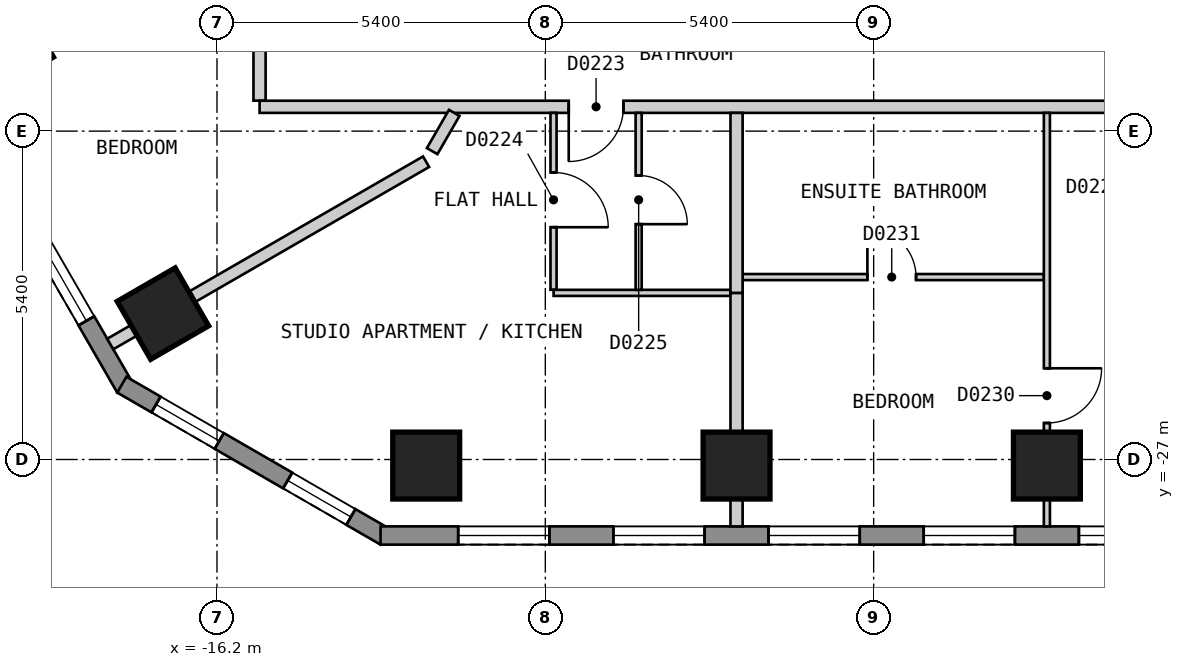
"""IFC4 building model, lengths in metres.
Left out: names, types, materials, properties, quantities, classifications, styles, units other than length and angle.
Written with IfcOpenShell. Run it as: python <this file> out.ifc"""

import sys

from ifc_helpers import new_model, si_unit, direction, frame, frame_2d, origin, origin_2d, place, context, subcontext, project, spatial, polyline, rectangle, outline, extrude, element, fill, save


model = new_model("IFC4")
c1 = context("Model", 3, precision=1e-05, world=origin(), true_north=direction((0.0, 1.0)))
c2 = subcontext(c1, "Body", "Model", "MODEL_VIEW")
j1 = project(units=[si_unit("LENGTHUNIT", "METRE"), si_unit("PLANEANGLEUNIT", "RADIAN")], contexts=[c1])
p1 = place(None, origin())
s1 = spatial("IfcSite", under=j1, at=p1, CompositionType="ELEMENT")
p2 = place(p1, origin())
s2 = spatial("IfcBuilding", under=s1, at=p2, CompositionType="ELEMENT")
p3 = place(p2, frame((0.0, 0.0, 47.4)))
s3 = spatial("IfcBuildingStorey", under=s2, at=p3, CompositionType="ELEMENT", Elevation=47.4)
for number, where, z_axis, x_axis in (
    (1, (-19.641, -20.181, 0.0), (0.0, 0.0, 1.0), (0.5, -0.866, 0.0)),
    (2, (-17.089, -24.601, 0.0), (0.0, 0.0, 1.0), (0.5, -0.866, 0.0)),
    (3, (-12.759, -27.1, 0.0), (0.0, 0.0, 1.0), (1.0, 0.0, 0.0)),
    (4, (-7.655, -27.1, 0.0), (0.0, 0.0, 1.0), (1.0, 0.0, 0.0)),
    (5, (-2.551, -27.1, 0.0), (0.0, 0.0, 1.0), (1.0, 0.0, 0.0)),
):
    element("IfcColumn", number, at=place(p3, frame(where, z_axis=z_axis, x_axis=x_axis)), inside=s3, PredefinedType="COLUMN", context=c2, shape_type="SweptSolid", body=[
        extrude(rectangle(XDim=1.1, YDim=1.1, at=origin_2d()), origin(), (0.0, 0.0, 1.0), 3.0),
    ])
p4 = place(p3, frame((-31.22, -2.425, 0.0), z_axis=(0.0, 0.0, 1.0), x_axis=(0.500001938803, -0.866024284413, 0.0)))
e6 = element("IfcWall", 6, at=p4, inside=s3, PredefinedType="SOLIDWALL", context=c2, shape_type="SweptSolid", body=[
    extrude(outline(polyline([(0.0, -0.15), (27.02, -0.15), (26.94, 0.15), (0.08, 0.15), (0.0, -0.15)])), origin(), (0.0, 0.0, 1.0), 2.7),
])
p5 = place(p4, frame((1.277, 0.0, 0.15)))
e7 = element("IfcOpeningElement", 7, at=p5, cuts=e6, PredefinedType="OPENING", context=c2, shape_type="SweptSolid", body=[
    extrude(rectangle(XDim=1.5, YDim=2.1, at=frame_2d((0.75, 1.05))), frame((0.0, 0.16, 0.0), z_axis=(0.0, -1.0, 0.0), x_axis=(1.0, 0.0, 0.0)), (0.0, 0.0, 1.0), 0.32),
])
p6 = place(p4, frame((3.829, 0.0, 0.15)))
e8 = element("IfcOpeningElement", 8, at=p6, cuts=e6, PredefinedType="OPENING", context=c2, shape_type="SweptSolid", body=[
    extrude(rectangle(XDim=1.5, YDim=2.1, at=frame_2d((0.75, 1.05))), frame((0.0, 0.16, 0.0), z_axis=(0.0, -1.0, 0.0), x_axis=(1.0, 0.0, 0.0)), (0.0, 0.0, 1.0), 0.32),
])
p7 = place(p4, frame((6.382, 0.0, 0.15)))
e9 = element("IfcOpeningElement", 9, at=p7, cuts=e6, PredefinedType="OPENING", context=c2, shape_type="SweptSolid", body=[
    extrude(rectangle(XDim=1.5, YDim=2.1, at=frame_2d((0.75, 1.05))), frame((0.0, 0.16, 0.0), z_axis=(0.0, -1.0, 0.0), x_axis=(1.0, 0.0, 0.0)), (0.0, 0.0, 1.0), 0.32),
])
p8 = place(p4, frame((8.933, 0.0, 0.15)))
e10 = element("IfcOpeningElement", 10, at=p8, cuts=e6, PredefinedType="OPENING", context=c2, shape_type="SweptSolid", body=[
    extrude(rectangle(XDim=1.5, YDim=2.1, at=frame_2d((0.75, 1.05))), frame((0.0, 0.16, 0.0), z_axis=(0.0, -1.0, 0.0), x_axis=(1.0, 0.0, 0.0)), (0.0, 0.0, 1.0), 0.32),
])
p9 = place(p4, frame((11.485, 0.0, 0.15)))
e11 = element("IfcOpeningElement", 11, at=p9, cuts=e6, PredefinedType="OPENING", context=c2, shape_type="SweptSolid", body=[
    extrude(rectangle(XDim=1.5, YDim=2.1, at=frame_2d((0.75, 1.05))), frame((0.0, 0.16, 0.0), z_axis=(0.0, -1.0, 0.0), x_axis=(1.0, 0.0, 0.0)), (0.0, 0.0, 1.0), 0.32),
])
p10 = place(p4, frame((14.037, 0.0, 0.15)))
e12 = element("IfcOpeningElement", 12, at=p10, cuts=e6, PredefinedType="OPENING", context=c2, shape_type="SweptSolid", body=[
    extrude(rectangle(XDim=1.5, YDim=2.1, at=frame_2d((0.75, 1.05))), frame((0.0, 0.16, 0.0), z_axis=(0.0, -1.0, 0.0), x_axis=(1.0, 0.0, 0.0)), (0.0, 0.0, 1.0), 0.32),
])
p11 = place(p4, frame((16.589, 0.0, 0.15)))
e13 = element("IfcOpeningElement", 13, at=p11, cuts=e6, PredefinedType="OPENING", context=c2, shape_type="SweptSolid", body=[
    extrude(rectangle(XDim=1.5, YDim=2.1, at=frame_2d((0.75, 1.05))), frame((0.0, 0.16, 0.0), z_axis=(0.0, -1.0, 0.0), x_axis=(1.0, 0.0, 0.0)), (0.0, 0.0, 1.0), 0.32),
])
p12 = place(p4, frame((19.141, 0.0, 0.15)))
e14 = element("IfcOpeningElement", 14, at=p12, cuts=e6, PredefinedType="OPENING", context=c2, shape_type="SweptSolid", body=[
    extrude(rectangle(XDim=1.5, YDim=2.1, at=frame_2d((0.75, 1.05))), frame((0.0, 0.16, 0.0), z_axis=(0.0, -1.0, 0.0), x_axis=(1.0, 0.0, 0.0)), (0.0, 0.0, 1.0), 0.32),
])
p13 = place(p4, frame((21.693, 0.0, 0.15)))
e15 = element("IfcOpeningElement", 15, at=p13, cuts=e6, PredefinedType="OPENING", context=c2, shape_type="SweptSolid", body=[
    extrude(rectangle(XDim=1.5, YDim=2.1, at=frame_2d((0.75, 1.05))), frame((0.0, 0.16, 0.0), z_axis=(0.0, -1.0, 0.0), x_axis=(1.0, 0.0, 0.0)), (0.0, 0.0, 1.0), 0.32),
])
p14 = place(p4, frame((24.244, 0.0, 0.15)))
e16 = element("IfcOpeningElement", 16, at=p14, cuts=e6, PredefinedType="OPENING", context=c2, shape_type="SweptSolid", body=[
    extrude(rectangle(XDim=1.5, YDim=2.1, at=frame_2d((0.75, 1.05))), frame((0.0, 0.16, 0.0), z_axis=(0.0, -1.0, 0.0), x_axis=(1.0, 0.0, 0.0)), (0.0, 0.0, 1.0), 0.32),
])
p15 = place(p3, frame((-17.765, -25.77, 0.0), z_axis=(0.0, 0.0, 1.0), x_axis=(0.866010750942, -0.50002537861, 0.0)))
e17 = element("IfcWall", 17, at=p15, inside=s3, PredefinedType="SOLIDWALL", context=c2, shape_type="SweptSolid", body=[
    extrude(outline(polyline([(0.0, -0.15), (5.0, -0.15), (4.919, 0.15), (0.08, 0.15), (0.0, -0.15)])), origin(), (0.0, 0.0, 1.0), 2.7),
])
p16 = place(p15, frame((0.65, 0.0, 0.15)))
e18 = element("IfcOpeningElement", 18, at=p16, cuts=e17, PredefinedType="OPENING", context=c2, shape_type="SweptSolid", body=[
    extrude(rectangle(XDim=1.2, YDim=2.1, at=frame_2d((0.6, 1.05))), frame((0.0, 0.16, 0.0), z_axis=(0.0, -1.0, 0.0), x_axis=(1.0, 0.0, 0.0)), (0.0, 0.0, 1.0), 0.32),
])
p17 = place(p15, frame((3.15, 0.0, 0.15)))
e19 = element("IfcOpeningElement", 19, at=p17, cuts=e17, PredefinedType="OPENING", context=c2, shape_type="SweptSolid", body=[
    extrude(rectangle(XDim=1.2, YDim=2.1, at=frame_2d((0.6, 1.05))), frame((0.0, 0.16, 0.0), z_axis=(0.0, -1.0, 0.0), x_axis=(1.0, 0.0, 0.0)), (0.0, 0.0, 1.0), 0.32),
])
p18 = place(p3, frame((-13.51, -28.25, 0.0), z_axis=(0.0, 0.0, 1.0), x_axis=(1.0, 0.0, 0.0)))
e20 = element("IfcWall", 20, at=p18, inside=s3, PredefinedType="SOLIDWALL", context=c2, shape_type="SweptSolid", body=[
    extrude(outline(polyline([(0.0, -0.15), (27.02, -0.15), (26.94, 0.15), (0.08, 0.15), (0.0, -0.15)])), origin(), (0.0, 0.0, 1.0), 2.7),
])
p19 = place(p18, frame((1.277, 0.0, 0.15)))
e21 = element("IfcOpeningElement", 21, at=p19, cuts=e20, PredefinedType="OPENING", context=c2, shape_type="SweptSolid", body=[
    extrude(rectangle(XDim=1.5, YDim=2.1, at=frame_2d((0.75, 1.05))), frame((0.0, 0.16, 0.0), z_axis=(0.0, -1.0, 0.0), x_axis=(1.0, 0.0, 0.0)), (0.0, 0.0, 1.0), 0.32),
])
p20 = place(p18, frame((3.829, 0.0, 0.15)))
e22 = element("IfcOpeningElement", 22, at=p20, cuts=e20, PredefinedType="OPENING", context=c2, shape_type="SweptSolid", body=[
    extrude(rectangle(XDim=1.5, YDim=2.1, at=frame_2d((0.75, 1.05))), frame((0.0, 0.16, 0.0), z_axis=(0.0, -1.0, 0.0), x_axis=(1.0, 0.0, 0.0)), (0.0, 0.0, 1.0), 0.32),
])
p21 = place(p18, frame((6.381, 0.0, 0.15)))
e23 = element("IfcOpeningElement", 23, at=p21, cuts=e20, PredefinedType="OPENING", context=c2, shape_type="SweptSolid", body=[
    extrude(rectangle(XDim=1.5, YDim=2.1, at=frame_2d((0.75, 1.05))), frame((0.0, 0.16, 0.0), z_axis=(0.0, -1.0, 0.0), x_axis=(1.0, 0.0, 0.0)), (0.0, 0.0, 1.0), 0.32),
])
p22 = place(p18, frame((8.933, 0.0, 0.15)))
e24 = element("IfcOpeningElement", 24, at=p22, cuts=e20, PredefinedType="OPENING", context=c2, shape_type="SweptSolid", body=[
    extrude(rectangle(XDim=1.5, YDim=2.1, at=frame_2d((0.75, 1.05))), frame((0.0, 0.16, 0.0), z_axis=(0.0, -1.0, 0.0), x_axis=(1.0, 0.0, 0.0)), (0.0, 0.0, 1.0), 0.32),
])
p23 = place(p18, frame((11.485, 0.0, 0.15)))
e25 = element("IfcOpeningElement", 25, at=p23, cuts=e20, PredefinedType="OPENING", context=c2, shape_type="SweptSolid", body=[
    extrude(rectangle(XDim=1.5, YDim=2.1, at=frame_2d((0.75, 1.05))), frame((0.0, 0.16, 0.0), z_axis=(0.0, -1.0, 0.0), x_axis=(1.0, 0.0, 0.0)), (0.0, 0.0, 1.0), 0.32),
])
p24 = place(p18, frame((14.037, 0.0, 0.15)))
e26 = element("IfcOpeningElement", 26, at=p24, cuts=e20, PredefinedType="OPENING", context=c2, shape_type="SweptSolid", body=[
    extrude(rectangle(XDim=1.5, YDim=2.1, at=frame_2d((0.75, 1.05))), frame((0.0, 0.16, 0.0), z_axis=(0.0, -1.0, 0.0), x_axis=(1.0, 0.0, 0.0)), (0.0, 0.0, 1.0), 0.32),
])
p25 = place(p18, frame((16.589, 0.0, 0.15)))
e27 = element("IfcOpeningElement", 27, at=p25, cuts=e20, PredefinedType="OPENING", context=c2, shape_type="SweptSolid", body=[
    extrude(rectangle(XDim=1.5, YDim=2.1, at=frame_2d((0.75, 1.05))), frame((0.0, 0.16, 0.0), z_axis=(0.0, -1.0, 0.0), x_axis=(1.0, 0.0, 0.0)), (0.0, 0.0, 1.0), 0.32),
])
p26 = place(p18, frame((19.141, 0.0, 0.15)))
e28 = element("IfcOpeningElement", 28, at=p26, cuts=e20, PredefinedType="OPENING", context=c2, shape_type="SweptSolid", body=[
    extrude(rectangle(XDim=1.5, YDim=2.1, at=frame_2d((0.75, 1.05))), frame((0.0, 0.16, 0.0), z_axis=(0.0, -1.0, 0.0), x_axis=(1.0, 0.0, 0.0)), (0.0, 0.0, 1.0), 0.32),
])
p27 = place(p18, frame((21.693, 0.0, 0.15)))
e29 = element("IfcOpeningElement", 29, at=p27, cuts=e20, PredefinedType="OPENING", context=c2, shape_type="SweptSolid", body=[
    extrude(rectangle(XDim=1.5, YDim=2.1, at=frame_2d((0.75, 1.05))), frame((0.0, 0.16, 0.0), z_axis=(0.0, -1.0, 0.0), x_axis=(1.0, 0.0, 0.0)), (0.0, 0.0, 1.0), 0.32),
])
p28 = place(p18, frame((24.245, 0.0, 0.15)))
e30 = element("IfcOpeningElement", 30, at=p28, cuts=e20, PredefinedType="OPENING", context=c2, shape_type="SweptSolid", body=[
    extrude(rectangle(XDim=1.5, YDim=2.1, at=frame_2d((0.75, 1.05))), frame((0.0, 0.16, 0.0), z_axis=(0.0, -1.0, 0.0), x_axis=(1.0, 0.0, 0.0)), (0.0, 0.0, 1.0), 0.32),
])
p29 = place(p3, frame((-15.5, -16.5, 0.0), z_axis=(0.0, 0.0, 1.0), x_axis=(0.0, -1.0, 0.0)))
e31 = element("IfcWall", 31, at=p29, inside=s3, PredefinedType="PARTITIONING", context=c2, shape_type="SweptSolid", body=[
    extrude(rectangle(XDim=4.599, YDim=0.2, at=frame_2d((2.3, 0.0))), origin(), (0.0, 0.0, 1.0), 2.7),
])
p30 = place(p3, frame((-15.499, -21.2, 0.0), z_axis=(0.0, 0.0, 1.0), x_axis=(1.0, 0.0, 0.0)))
e32 = element("IfcWall", 32, at=p30, inside=s3, PredefinedType="PARTITIONING", context=c2, shape_type="SweptSolid", body=[
    extrude(rectangle(XDim=30.898, YDim=0.2, at=frame_2d((15.449, 0.0))), origin(), (0.0, 0.0, 1.0), 2.7),
])
p31 = place(p30, frame((5.084, 0.0, 0.0)))
e33 = element("IfcOpeningElement", 33, at=p31, cuts=e32, PredefinedType="OPENING", context=c2, shape_type="SweptSolid", body=[
    extrude(rectangle(XDim=0.9, YDim=2.1, at=frame_2d((0.45, 1.05))), frame((0.0, 0.11, 0.0), z_axis=(0.0, -1.0, 0.0), x_axis=(1.0, 0.0, 0.0)), (0.0, 0.0, 1.0), 0.22),
])
p32 = place(p30, frame((15.0, 0.0, 0.0)))
e34 = element("IfcOpeningElement", 34, at=p32, cuts=e32, PredefinedType="OPENING", context=c2, shape_type="SweptSolid", body=[
    extrude(rectangle(XDim=1.0, YDim=2.1, at=frame_2d((0.5, 1.05))), frame((0.0, 0.11, 0.0), z_axis=(0.0, -1.0, 0.0), x_axis=(1.0, 0.0, 0.0)), (0.0, 0.0, 1.0), 0.22),
])
p33 = place(p30, frame((25.015, 0.0, 0.0)))
e35 = element("IfcOpeningElement", 35, at=p33, cuts=e32, PredefinedType="OPENING", context=c2, shape_type="SweptSolid", body=[
    extrude(rectangle(XDim=0.9, YDim=2.1, at=frame_2d((0.45, 1.05))), frame((0.0, 0.11, 0.0), z_axis=(0.0, -1.0, 0.0), x_axis=(1.0, 0.0, 0.0)), (0.0, 0.0, 1.0), 0.22),
])
p34 = place(p3, frame((-10.665, -21.3, 0.0), z_axis=(0.0, 0.0, 1.0), x_axis=(0.0, -1.0, 0.0)))
e36 = element("IfcWall", 36, at=p34, inside=s3, PredefinedType="PARTITIONING", context=c2, shape_type="SweptSolid", body=[
    extrude(rectangle(XDim=2.909, YDim=0.1, at=frame_2d((1.455, 0.0))), origin(), (0.0, 0.0, 1.0), 2.7),
])
p35 = place(p34, frame((0.98, 0.0, 0.0)))
e37 = element("IfcOpeningElement", 37, at=p35, cuts=e36, PredefinedType="OPENING", context=c2, shape_type="SweptSolid", body=[
    extrude(rectangle(XDim=0.9, YDim=2.1, at=frame_2d((0.45, 1.05))), frame((0.0, 0.06, 0.0), z_axis=(0.0, -1.0, 0.0), x_axis=(1.0, 0.0, 0.0)), (0.0, 0.0, 1.0), 0.12),
])
p36 = place(p3, frame((-7.555, -24.0, 0.0), z_axis=(0.0, 0.0, 1.0), x_axis=(1.0, 0.0, 0.0)))
e38 = element("IfcWall", 38, at=p36, inside=s3, PredefinedType="PARTITIONING", context=c2, shape_type="SweptSolid", body=[
    extrude(rectangle(XDim=4.954, YDim=0.1, at=frame_2d((2.477, 0.0))), origin(), (0.0, 0.0, 1.0), 2.7),
])
p37 = place(p36, frame((2.052, 0.0, 0.0)))
e39 = element("IfcOpeningElement", 39, at=p37, cuts=e38, PredefinedType="OPENING", context=c2, shape_type="SweptSolid", body=[
    extrude(rectangle(XDim=0.8, YDim=2.1, at=frame_2d((0.4, 1.05))), frame((0.0, 0.06, 0.0), z_axis=(0.0, -1.0, 0.0), x_axis=(1.0, 0.0, 0.0)), (0.0, 0.0, 1.0), 0.12),
])
p38 = place(p3, frame((-10.664, -24.26, 0.0), z_axis=(0.0, 0.0, 1.0), x_axis=(1.0, 0.0, 0.0)))
e40 = element("IfcWall", 40, at=p38, inside=s3, PredefinedType="PARTITIONING", context=c2, shape_type="SweptSolid", body=[
    extrude(rectangle(XDim=2.909, YDim=0.1, at=frame_2d((1.455, 0.0))), origin(), (0.0, 0.0, 1.0), 2.7),
])
p39 = place(p3, frame((-9.265, -24.21, 0.0), z_axis=(0.0, 0.0, 1.0), x_axis=(0.0, 1.0, 0.0)))
e41 = element("IfcWall", 41, at=p39, inside=s3, PredefinedType="PARTITIONING", context=c2, shape_type="SweptSolid", body=[
    extrude(rectangle(XDim=2.91, YDim=0.1, at=frame_2d((1.455, 0.0))), origin(), (0.0, 0.0, 1.0), 2.7),
])
p40 = place(p39, frame((1.08, 0.0, 0.0)))
e42 = element("IfcOpeningElement", 42, at=p40, cuts=e41, PredefinedType="OPENING", context=c2, shape_type="SweptSolid", body=[
    extrude(rectangle(XDim=0.8, YDim=2.1, at=frame_2d((0.4, 1.05))), frame((0.0, 0.06, 0.0), z_axis=(0.0, -1.0, 0.0), x_axis=(1.0, 0.0, 0.0)), (0.0, 0.0, 1.0), 0.12),
])
p41 = place(p3, frame((-2.551, -28.1, 0.0), z_axis=(0.0, 0.0, 1.0), x_axis=(0.0, 1.0, 0.0)))
e43 = element("IfcWall", 43, at=p41, inside=s3, PredefinedType="PARTITIONING", context=c2, shape_type="SweptSolid", body=[
    extrude(rectangle(XDim=6.8, YDim=0.1, at=frame_2d((3.4, 0.0))), origin(), (0.0, 0.0, 1.0), 2.7),
])
p42 = place(p41, frame((1.7, 0.0, 0.0)))
e44 = element("IfcOpeningElement", 44, at=p42, cuts=e43, PredefinedType="OPENING", context=c2, shape_type="SweptSolid", body=[
    extrude(rectangle(XDim=0.9, YDim=2.1, at=frame_2d((0.45, 1.05))), frame((0.0, 0.06, 0.0), z_axis=(0.0, -1.0, 0.0), x_axis=(1.0, 0.0, 0.0)), (0.0, 0.0, 1.0), 0.12),
])
p43 = place(p3, frame((-20.507, -20.681, 0.0), z_axis=(0.0, 0.0, 1.0), x_axis=(0.866028446103, 0.499994730513, 0.0)))
e45 = element("IfcWall", 45, at=p43, inside=s3, PredefinedType="PARTITIONING", context=c2, shape_type="SweptSolid", body=[
    extrude(rectangle(XDim=5.666, YDim=0.1, at=frame_2d((2.833, 0.0))), origin(), (0.0, 0.0, 1.0), 2.7),
])
p44 = place(p43, frame((2.44, 0.0, 0.0)))
e46 = element("IfcOpeningElement", 46, at=p44, cuts=e45, PredefinedType="OPENING", context=c2, shape_type="SweptSolid", body=[
    extrude(rectangle(XDim=0.9, YDim=2.1, at=frame_2d((0.45, 1.05))), frame((0.0, 0.06, 0.0), z_axis=(0.0, -1.0, 0.0), x_axis=(1.0, 0.0, 0.0)), (0.0, 0.0, 1.0), 0.12),
])
p45 = place(p3, frame((-7.655, -24.26, 0.0), z_axis=(0.0, 0.0, 1.0), x_axis=(0.0, -1.0, 0.0)))
e47 = element("IfcWall", 47, at=p45, inside=s3, PredefinedType="PARTITIONING", context=c2, shape_type="SweptSolid", body=[
    extrude(rectangle(XDim=3.84, YDim=0.2, at=frame_2d((1.92, 0.0))), origin(), (0.0, 0.0, 1.0), 2.7),
])
p46 = place(p3, frame((-12.661, -21.929, 0.0), z_axis=(0.0, 0.0, 1.0), x_axis=(0.499683639304, 0.866207977689, 0.0)))
e48 = element("IfcWall", 48, at=p46, inside=s3, PredefinedType="PARTITIONING", context=c2, shape_type="SweptSolid", body=[
    extrude(rectangle(XDim=0.726, YDim=0.2, at=frame_2d((0.363, 0.0))), origin(), (0.0, 0.0, 1.0), 2.7),
])
p47 = place(p3, frame((-7.655, -24.26, 0.0), z_axis=(0.0, 0.0, 1.0), x_axis=(0.0, 1.0, 0.0)))
e49 = element("IfcWall", 49, at=p47, inside=s3, PredefinedType="PARTITIONING", context=c2, shape_type="SweptSolid", body=[
    extrude(rectangle(XDim=2.96, YDim=0.2, at=frame_2d((1.48, 0.0))), origin(), (0.0, 0.0, 1.0), 2.7),
])
p48 = place(p3, frame((-17.955, -25.101, 0.0), z_axis=(0.0, 0.0, 1.0), x_axis=(0.866080519133, 0.499904525262, 0.0)))
e50 = element("IfcWall", 50, at=p48, inside=s3, PredefinedType="PARTITIONING", context=c2, shape_type="SweptSolid", body=[
    extrude(rectangle(XDim=5.997, YDim=0.2, at=frame_2d((2.999, 0.0))), origin(), (0.0, 0.0, 1.0), 2.7),
])
p49 = place(p14, origin())
e51 = element("IfcWindow", 51, at=p49, inside=s3, PartitioningType="SINGLE_PANEL", PredefinedType="WINDOW", context=c2, shape_type="SweptSolid", body=[
    extrude(rectangle(XDim=1.5, YDim=2.1, at=frame_2d((0.75, 1.05))), frame((0.0, 0.03, 0.0), z_axis=(0.0, -1.0, 0.0), x_axis=(1.0, 0.0, 0.0)), (0.0, 0.0, 1.0), 0.06),
])
fill(e16, e51)
p50 = place(p16, origin())
e52 = element("IfcWindow", 52, at=p50, inside=s3, PartitioningType="SINGLE_PANEL", PredefinedType="WINDOW", context=c2, shape_type="SweptSolid", body=[
    extrude(rectangle(XDim=1.2, YDim=2.1, at=frame_2d((0.6, 1.05))), frame((0.0, 0.03, 0.0), z_axis=(0.0, -1.0, 0.0), x_axis=(1.0, 0.0, 0.0)), (0.0, 0.0, 1.0), 0.06),
])
fill(e18, e52)
p51 = place(p17, origin())
e53 = element("IfcWindow", 53, at=p51, inside=s3, PartitioningType="SINGLE_PANEL", PredefinedType="WINDOW", context=c2, shape_type="SweptSolid", body=[
    extrude(rectangle(XDim=1.2, YDim=2.1, at=frame_2d((0.6, 1.05))), frame((0.0, 0.03, 0.0), z_axis=(0.0, -1.0, 0.0), x_axis=(1.0, 0.0, 0.0)), (0.0, 0.0, 1.0), 0.06),
])
fill(e19, e53)
p52 = place(p19, origin())
e54 = element("IfcWindow", 54, at=p52, inside=s3, PartitioningType="SINGLE_PANEL", PredefinedType="WINDOW", context=c2, shape_type="SweptSolid", body=[
    extrude(rectangle(XDim=1.5, YDim=2.1, at=frame_2d((0.75, 1.05))), frame((0.0, 0.03, 0.0), z_axis=(0.0, -1.0, 0.0), x_axis=(1.0, 0.0, 0.0)), (0.0, 0.0, 1.0), 0.06),
])
fill(e21, e54)
p53 = place(p20, origin())
e55 = element("IfcWindow", 55, at=p53, inside=s3, PartitioningType="SINGLE_PANEL", PredefinedType="WINDOW", context=c2, shape_type="SweptSolid", body=[
    extrude(rectangle(XDim=1.5, YDim=2.1, at=frame_2d((0.75, 1.05))), frame((0.0, 0.03, 0.0), z_axis=(0.0, -1.0, 0.0), x_axis=(1.0, 0.0, 0.0)), (0.0, 0.0, 1.0), 0.06),
])
fill(e22, e55)
p54 = place(p21, origin())
e56 = element("IfcWindow", 56, at=p54, inside=s3, PartitioningType="SINGLE_PANEL", PredefinedType="WINDOW", context=c2, shape_type="SweptSolid", body=[
    extrude(rectangle(XDim=1.5, YDim=2.1, at=frame_2d((0.75, 1.05))), frame((0.0, 0.03, 0.0), z_axis=(0.0, -1.0, 0.0), x_axis=(1.0, 0.0, 0.0)), (0.0, 0.0, 1.0), 0.06),
])
fill(e23, e56)
p55 = place(p22, origin())
e57 = element("IfcWindow", 57, at=p55, inside=s3, PartitioningType="SINGLE_PANEL", PredefinedType="WINDOW", context=c2, shape_type="SweptSolid", body=[
    extrude(rectangle(XDim=1.5, YDim=2.1, at=frame_2d((0.75, 1.05))), frame((0.0, 0.03, 0.0), z_axis=(0.0, -1.0, 0.0), x_axis=(1.0, 0.0, 0.0)), (0.0, 0.0, 1.0), 0.06),
])
fill(e24, e57)
p56 = place(p23, origin())
e58 = element("IfcWindow", 58, at=p56, inside=s3, PartitioningType="SINGLE_PANEL", PredefinedType="WINDOW", context=c2, shape_type="SweptSolid", body=[
    extrude(rectangle(XDim=1.5, YDim=2.1, at=frame_2d((0.75, 1.05))), frame((0.0, 0.03, 0.0), z_axis=(0.0, -1.0, 0.0), x_axis=(1.0, 0.0, 0.0)), (0.0, 0.0, 1.0), 0.06),
])
fill(e25, e58)
p57 = place(p31, origin())
e59 = element("IfcDoor", 59, at=p57, inside=s3, OperationType="SINGLE_SWING_LEFT", PredefinedType="DOOR", context=c2, shape_type="SweptSolid", body=[
    extrude(rectangle(XDim=0.9, YDim=2.1, at=frame_2d((0.45, 1.05))), frame((0.0, 0.025, 0.0), z_axis=(0.0, -1.0, 0.0), x_axis=(1.0, 0.0, 0.0)), (0.0, 0.0, 1.0), 0.05),
])
fill(e33, e59)
p58 = place(p35, origin())
e60 = element("IfcDoor", 60, at=p58, inside=s3, OperationType="SINGLE_SWING_RIGHT", PredefinedType="DOOR", context=c2, shape_type="SweptSolid", body=[
    extrude(rectangle(XDim=0.9, YDim=2.1, at=frame_2d((0.45, 1.05))), frame((0.0, 0.025, 0.0), z_axis=(0.0, -1.0, 0.0), x_axis=(1.0, 0.0, 0.0)), (0.0, 0.0, 1.0), 0.05),
])
fill(e37, e60)
p59 = place(p40, origin())
e61 = element("IfcDoor", 61, at=p59, inside=s3, OperationType="SINGLE_SWING_LEFT", PredefinedType="DOOR", context=c2, shape_type="SweptSolid", body=[
    extrude(rectangle(XDim=0.8, YDim=2.1, at=frame_2d((0.4, 1.05))), frame((0.0, 0.025, 0.0), z_axis=(0.0, -1.0, 0.0), x_axis=(1.0, 0.0, 0.0)), (0.0, 0.0, 1.0), 0.05),
])
fill(e42, e61)
p60 = place(p42, origin())
e62 = element("IfcDoor", 62, at=p60, inside=s3, OperationType="SINGLE_SWING_RIGHT", PredefinedType="DOOR", context=c2, shape_type="SweptSolid", body=[
    extrude(rectangle(XDim=0.9, YDim=2.1, at=frame_2d((0.45, 1.05))), frame((0.0, 0.025, 0.0), z_axis=(0.0, -1.0, 0.0), x_axis=(1.0, 0.0, 0.0)), (0.0, 0.0, 1.0), 0.05),
])
fill(e44, e62)
p61 = place(p37, origin())
e63 = element("IfcDoor", 63, at=p61, inside=s3, OperationType="SINGLE_SWING_LEFT", PredefinedType="DOOR", context=c2, shape_type="SweptSolid", body=[
    extrude(rectangle(XDim=0.8, YDim=2.1, at=frame_2d((0.4, 1.05))), frame((0.0, 0.025, 0.0), z_axis=(0.0, -1.0, 0.0), x_axis=(1.0, 0.0, 0.0)), (0.0, 0.0, 1.0), 0.05),
])
fill(e39, e63)
save(model, sys.argv[1])
